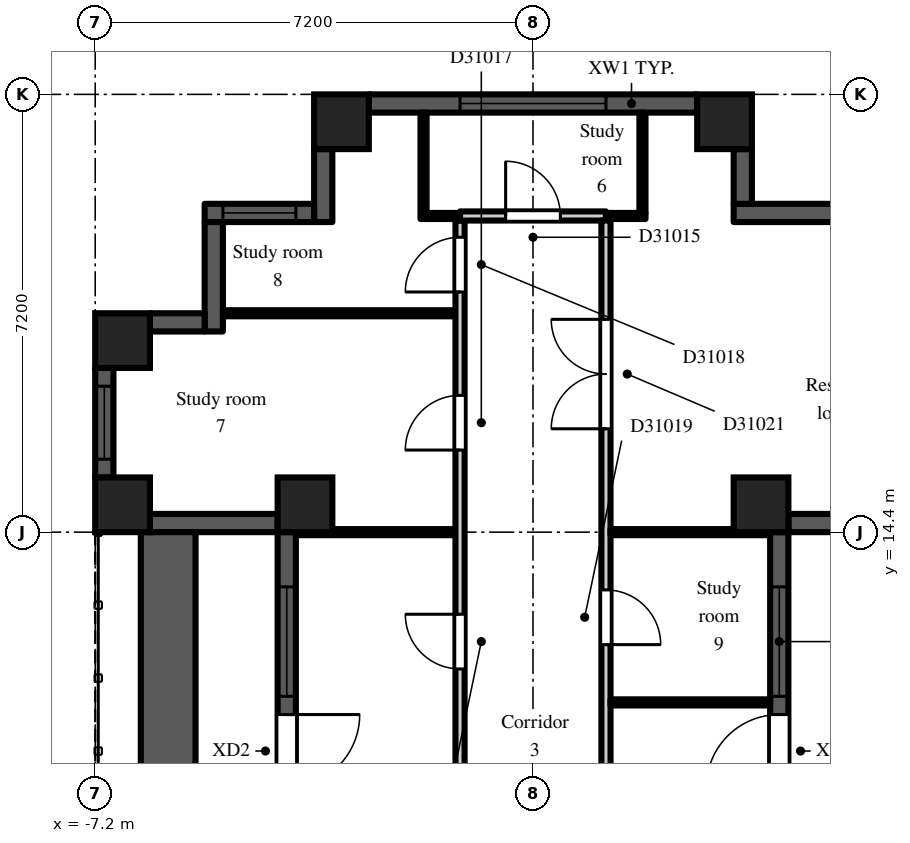
"""IFC4 building model, lengths in metres.
Left out: names, types, materials, properties, quantities, classifications, styles, units other than length and angle.
Written with IfcOpenShell. Run it as: python <this file> out.ifc"""

import sys

from ifc_helpers import new_model, si_unit, direction, frame, frame_2d, origin, origin_2d, place, context, subcontext, project, spatial, rectangle, extrude, element, fill, save


model = new_model("IFC4")
c1 = context("Model", 3, precision=1e-05, world=origin(), true_north=direction((0.0, 1.0)))
c2 = subcontext(c1, "Body", "Model", "MODEL_VIEW")
j1 = project(units=[si_unit("LENGTHUNIT", "METRE"), si_unit("PLANEANGLEUNIT", "RADIAN")], contexts=[c1])
p1 = place(None, origin())
s1 = spatial("IfcSite", under=j1, at=p1, CompositionType="ELEMENT")
p2 = place(p1, origin())
s2 = spatial("IfcBuilding", under=s1, at=p2, CompositionType="ELEMENT")
p3 = place(p2, frame((0.0, 0.0, 216.9)))
s3 = spatial("IfcBuildingStorey", under=s2, at=p3, CompositionType="ELEMENT", Elevation=216.9)
for number, where, z_axis, x_axis in (
    (1, (-6.75, 14.85, 0.0), (0.0, 0.0, 1.0), (1.0, 0.0, 0.0)),
    (2, (-6.75, 17.55, 0.0), (0.0, 0.0, 1.0), (1.0, 0.0, 0.0)),
    (3, (-3.75, 14.85, 0.0), (0.0, 0.0, 1.0), (1.0, 0.0, 0.0)),
    (4, (-3.15, 21.15, 0.0), (0.0, 0.0, 1.0), (1.0, 0.0, 0.0)),
    (5, (3.15, 21.15, 0.0), (0.0, 0.0, 1.0), (1.0, 0.0, 0.0)),
    (6, (3.75, 14.85, 0.0), (0.0, 0.0, 1.0), (1.0, 0.0, 0.0)),
):
    element("IfcColumn", number, at=place(p3, frame(where, z_axis=z_axis, x_axis=x_axis)), inside=s3, PredefinedType="COLUMN", context=c2, shape_type="SweptSolid", body=[
        extrude(rectangle(XDim=0.9, YDim=0.9, at=origin_2d()), origin(), (0.0, 0.0, 1.0), 3.0),
    ])
p4 = place(p3, frame((4.05, 7.2, 0.0), z_axis=(0.0, 0.0, 1.0), x_axis=(0.0, 1.0, 0.0)))
e7 = element("IfcWall", 7, at=p4, inside=s3, PredefinedType="SOLIDWALL", context=c2, shape_type="SweptSolid", body=[
    extrude(rectangle(XDim=7.2, YDim=0.3, at=frame_2d((3.6, 0.0))), origin(), (0.0, 0.0, 1.0), 2.3),
])
p5 = place(p4, frame((3.0, 0.0, 0.0)))
e8 = element("IfcOpeningElement", 8, at=p5, cuts=e7, PredefinedType="OPENING", context=c2, shape_type="SweptSolid", body=[
    extrude(rectangle(XDim=1.2, YDim=2.05, at=frame_2d((0.6, 1.025))), frame((0.0, 0.16, 0.0), z_axis=(0.0, -1.0, 0.0), x_axis=(1.0, 0.0, 0.0)), (0.0, 0.0, 1.0), 0.32),
])
p6 = place(p4, frame((0.9, 0.0, 0.2)))
e9 = element("IfcOpeningElement", 9, at=p6, cuts=e7, PredefinedType="OPENING", context=c2, shape_type="SweptSolid", body=[
    extrude(rectangle(XDim=1.8, YDim=1.85, at=frame_2d((0.9, 0.925))), frame((0.0, 0.16, 0.0), z_axis=(0.0, -1.0, 0.0), x_axis=(1.0, 0.0, 0.0)), (0.0, 0.0, 1.0), 0.32),
])
p7 = place(p4, frame((4.5, 0.0, 0.2)))
e10 = element("IfcOpeningElement", 10, at=p7, cuts=e7, PredefinedType="OPENING", context=c2, shape_type="SweptSolid", body=[
    extrude(rectangle(XDim=1.8, YDim=1.85, at=frame_2d((0.9, 0.925))), frame((0.0, 0.16, 0.0), z_axis=(0.0, -1.0, 0.0), x_axis=(1.0, 0.0, 0.0)), (0.0, 0.0, 1.0), 0.32),
])
p8 = place(p3, frame((4.2, 14.55, 0.0), z_axis=(0.0, 0.0, 1.0), x_axis=(1.0, 0.0, 0.0)))
e11 = element("IfcWall", 11, at=p8, inside=s3, PredefinedType="SOLIDWALL", context=c2, shape_type="SweptSolid", body=[
    extrude(rectangle(XDim=2.1, YDim=0.3, at=frame_2d((1.05, 0.0))), origin(), (0.0, 0.0, 1.0), 2.3),
])
p9 = place(p3, frame((5.1, 19.65, 0.0), z_axis=(0.0, 0.0, 1.0), x_axis=(-1.0, 0.0, 0.0)))
e12 = element("IfcWall", 12, at=p9, inside=s3, PredefinedType="SOLIDWALL", context=c2, shape_type="SweptSolid", body=[
    extrude(rectangle(XDim=1.8, YDim=0.3, at=frame_2d((0.9, 0.0))), origin(), (0.0, 0.0, 1.0), 2.6),
])
p10 = place(p3, frame((3.45, 19.8, 0.0), z_axis=(0.0, 0.0, 1.0), x_axis=(0.0, 1.0, 0.0)))
e13 = element("IfcWall", 13, at=p10, inside=s3, PredefinedType="SOLIDWALL", context=c2, shape_type="SweptSolid", body=[
    extrude(rectangle(XDim=0.9, YDim=0.3, at=frame_2d((0.45, 0.0))), origin(), (0.0, 0.0, 1.0), 2.6),
])
p11 = place(p3, frame((2.7, 21.45, 0.0), z_axis=(0.0, 0.0, 1.0), x_axis=(-1.0, 0.0, 0.0)))
e14 = element("IfcWall", 14, at=p11, inside=s3, PredefinedType="SOLIDWALL", context=c2, shape_type="SweptSolid", body=[
    extrude(rectangle(XDim=5.4, YDim=0.3, at=frame_2d((2.7, 0.0))), origin(), (0.0, 0.0, 1.0), 2.3),
])
p12 = place(p11, frame((1.5, 0.0, 0.2)))
e15 = element("IfcOpeningElement", 15, at=p12, cuts=e14, PredefinedType="OPENING", context=c2, shape_type="SweptSolid", body=[
    extrude(rectangle(XDim=2.4, YDim=1.85, at=frame_2d((1.2, 0.925))), frame((0.0, 0.16, 0.0), z_axis=(0.0, -1.0, 0.0), x_axis=(1.0, 0.0, 0.0)), (0.0, 0.0, 1.0), 0.32),
])
p13 = place(p3, frame((-3.45, 20.7, 0.0), z_axis=(0.0, 0.0, 1.0), x_axis=(0.0, -1.0, 0.0)))
e16 = element("IfcWall", 16, at=p13, inside=s3, PredefinedType="SOLIDWALL", context=c2, shape_type="SweptSolid", body=[
    extrude(rectangle(XDim=1.2, YDim=0.3, at=frame_2d((0.6, 0.0))), origin(), (0.0, 0.0, 1.0), 2.6),
])
p14 = place(p3, frame((-3.6, 19.65, 0.0), z_axis=(0.0, 0.0, 1.0), x_axis=(-1.0, 0.0, 0.0)))
e17 = element("IfcWall", 17, at=p14, inside=s3, PredefinedType="SOLIDWALL", context=c2, shape_type="SweptSolid", body=[
    extrude(rectangle(XDim=1.8, YDim=0.3, at=frame_2d((0.9, 0.0))), origin(), (0.0, 0.0, 1.0), 2.6),
])
p15 = place(p14, frame((0.3, 0.0, 0.2)))
e18 = element("IfcOpeningElement", 18, at=p15, cuts=e17, PredefinedType="OPENING", context=c2, shape_type="SweptSolid", body=[
    extrude(rectangle(XDim=1.2, YDim=1.85, at=frame_2d((0.6, 0.925))), frame((0.0, 0.16, 0.0), z_axis=(0.0, -1.0, 0.0), x_axis=(1.0, 0.0, 0.0)), (0.0, 0.0, 1.0), 0.32),
])
p16 = place(p3, frame((-5.25, 19.5, 0.0), z_axis=(0.0, 0.0, 1.0), x_axis=(0.0, -1.0, 0.0)))
e19 = element("IfcWall", 19, at=p16, inside=s3, PredefinedType="SOLIDWALL", context=c2, shape_type="SweptSolid", body=[
    extrude(rectangle(XDim=1.8, YDim=0.3, at=frame_2d((0.9, 0.0))), origin(), (0.0, 0.0, 1.0), 2.6),
])
p17 = place(p3, frame((-5.4, 17.85, 0.0), z_axis=(0.0, 0.0, 1.0), x_axis=(-1.0, 0.0, 0.0)))
e20 = element("IfcWall", 20, at=p17, inside=s3, PredefinedType="SOLIDWALL", context=c2, shape_type="SweptSolid", body=[
    extrude(rectangle(XDim=0.9, YDim=0.3, at=frame_2d((0.45, 0.0))), origin(), (0.0, 0.0, 1.0), 2.6),
])
p18 = place(p3, frame((-7.05, 17.1, 0.0), z_axis=(0.0, 0.0, 1.0), x_axis=(0.0, -1.0, 0.0)))
e21 = element("IfcWall", 21, at=p18, inside=s3, PredefinedType="SOLIDWALL", context=c2, shape_type="SweptSolid", body=[
    extrude(rectangle(XDim=1.8, YDim=0.3, at=frame_2d((0.9, 0.0))), origin(), (0.0, 0.0, 1.0), 2.3),
])
p19 = place(p18, frame((0.3, 0.0, 0.2)))
e22 = element("IfcOpeningElement", 22, at=p19, cuts=e21, PredefinedType="OPENING", context=c2, shape_type="SweptSolid", body=[
    extrude(rectangle(XDim=1.2, YDim=1.85, at=frame_2d((0.6, 0.925))), frame((0.0, 0.16, 0.0), z_axis=(0.0, -1.0, 0.0), x_axis=(1.0, 0.0, 0.0)), (0.0, 0.0, 1.0), 0.32),
])
p20 = place(p3, frame((-6.3, 14.55, 0.0), z_axis=(0.0, 0.0, 1.0), x_axis=(1.0, 0.0, 0.0)))
e23 = element("IfcWall", 23, at=p20, inside=s3, PredefinedType="SOLIDWALL", context=c2, shape_type="SweptSolid", body=[
    extrude(rectangle(XDim=2.1, YDim=0.3, at=frame_2d((1.05, 0.0))), origin(), (0.0, 0.0, 1.0), 2.3),
])
p21 = place(p3, frame((-4.05, 14.4, 0.0), z_axis=(0.0, 0.0, 1.0), x_axis=(0.0, -1.0, 0.0)))
e24 = element("IfcWall", 24, at=p21, inside=s3, PredefinedType="SOLIDWALL", context=c2, shape_type="SweptSolid", body=[
    extrude(rectangle(XDim=7.2, YDim=0.3, at=frame_2d((3.6, 0.0))), origin(), (0.0, 0.0, 1.0), 2.3),
])
p22 = place(p21, frame((3.0, 0.0, 0.0)))
e25 = element("IfcOpeningElement", 25, at=p22, cuts=e24, PredefinedType="OPENING", context=c2, shape_type="SweptSolid", body=[
    extrude(rectangle(XDim=1.2, YDim=2.05, at=frame_2d((0.6, 1.025))), frame((0.0, 0.16, 0.0), z_axis=(0.0, -1.0, 0.0), x_axis=(1.0, 0.0, 0.0)), (0.0, 0.0, 1.0), 0.32),
])
p23 = place(p21, frame((0.9, 0.0, 0.2)))
e26 = element("IfcOpeningElement", 26, at=p23, cuts=e24, PredefinedType="OPENING", context=c2, shape_type="SweptSolid", body=[
    extrude(rectangle(XDim=1.8, YDim=1.85, at=frame_2d((0.9, 0.925))), frame((0.0, 0.16, 0.0), z_axis=(0.0, -1.0, 0.0), x_axis=(1.0, 0.0, 0.0)), (0.0, 0.0, 1.0), 0.32),
])
p24 = place(p21, frame((4.5, 0.0, 0.2)))
e27 = element("IfcOpeningElement", 27, at=p24, cuts=e24, PredefinedType="OPENING", context=c2, shape_type="SweptSolid", body=[
    extrude(rectangle(XDim=1.8, YDim=1.85, at=frame_2d((0.9, 0.925))), frame((0.0, 0.16, 0.0), z_axis=(0.0, -1.0, 0.0), x_axis=(1.0, 0.0, 0.0)), (0.0, 0.0, 1.0), 0.32),
])
p25 = place(p3, frame((-6.0, 7.2, 0.0), z_axis=(0.0, 0.0, 1.0), x_axis=(0.0, 1.0, 0.0)))
e28 = element("IfcWall", 28, at=p25, inside=s3, PredefinedType="PARAPET", context=c2, shape_type="SweptSolid", body=[
    extrude(rectangle(XDim=7.2, YDim=0.9, at=frame_2d((3.6, 0.0))), origin(), (0.0, 0.0, 1.0), 0.8),
])
p26 = place(p3, frame((-5.1, 18.0, 0.0), z_axis=(0.0, 0.0, 1.0), x_axis=(1.0, 0.0, 0.0)))
e29 = element("IfcWall", 29, at=p26, inside=s3, PredefinedType="PARTITIONING", context=c2, shape_type="SweptSolid", body=[
    extrude(rectangle(XDim=3.825, YDim=0.1, at=frame_2d((1.913, 0.0))), origin(), (0.0, 0.0, 1.0), 2.6),
])
p27 = place(p3, frame((-3.9, 14.4, 0.0), z_axis=(0.0, 0.0, 1.0), x_axis=(1.0, 0.0, 0.0)))
e30 = element("IfcWall", 30, at=p27, inside=s3, PredefinedType="PARTITIONING", context=c2, shape_type="SweptSolid", body=[
    extrude(rectangle(XDim=2.625, YDim=0.1, at=frame_2d((1.312, 0.0))), origin(), (0.0, 0.0, 1.0), 2.6),
])
p28 = place(p3, frame((-1.8, 19.55, 0.0), z_axis=(0.0, 0.0, 1.0), x_axis=(0.0, 1.0, 0.0)))
e31 = element("IfcWall", 31, at=p28, inside=s3, PredefinedType="PARTITIONING", context=c2, shape_type="SweptSolid", body=[
    extrude(rectangle(XDim=1.75, YDim=0.1, at=frame_2d((0.875, 0.0))), origin(), (0.0, 0.0, 1.0), 2.6),
])
p29 = place(p3, frame((-1.75, 19.6, 0.0), z_axis=(0.0, 0.0, 1.0), x_axis=(1.0, 0.0, 0.0)))
e32 = element("IfcWall", 32, at=p29, inside=s3, PredefinedType="PARTITIONING", context=c2, shape_type="SweptSolid", body=[
    extrude(rectangle(XDim=0.55, YDim=0.1, at=frame_2d((0.275, 0.0))), origin(), (0.0, 0.0, 1.0), 2.6),
])
p30 = place(p3, frame((-1.2, 1.275, 0.0), z_axis=(0.0, 0.0, 1.0), x_axis=(0.0, 1.0, 0.0)))
e33 = element("IfcWall", 33, at=p30, inside=s3, PredefinedType="PARTITIONING", context=c2, shape_type="SweptSolid", body=[
    extrude(rectangle(XDim=18.25, YDim=0.15, at=frame_2d((9.125, 0.0))), origin(), (0.0, 0.0, 1.0), 2.6),
])
p31 = place(p30, frame((2.475, 0.0, 0.0)))
e34 = element("IfcOpeningElement", 34, at=p31, cuts=e33, PredefinedType="OPENING", context=c2, shape_type="SweptSolid", body=[
    extrude(rectangle(XDim=0.9, YDim=2.1, at=frame_2d((0.45, 1.05))), frame((0.0, 0.085, 0.0), z_axis=(0.0, -1.0, 0.0), x_axis=(1.0, 0.0, 0.0)), (0.0, 0.0, 1.0), 0.17),
])
p32 = place(p30, frame((10.875, 0.0, 0.0)))
e35 = element("IfcOpeningElement", 35, at=p32, cuts=e33, PredefinedType="OPENING", context=c2, shape_type="SweptSolid", body=[
    extrude(rectangle(XDim=0.9, YDim=2.1, at=frame_2d((0.45, 1.05))), frame((0.0, 0.085, 0.0), z_axis=(0.0, -1.0, 0.0), x_axis=(1.0, 0.0, 0.0)), (0.0, 0.0, 1.0), 0.17),
])
p33 = place(p30, frame((14.475, 0.0, 0.0)))
e36 = element("IfcOpeningElement", 36, at=p33, cuts=e33, PredefinedType="OPENING", context=c2, shape_type="SweptSolid", body=[
    extrude(rectangle(XDim=0.9, YDim=2.1, at=frame_2d((0.45, 1.05))), frame((0.0, 0.085, 0.0), z_axis=(0.0, -1.0, 0.0), x_axis=(1.0, 0.0, 0.0)), (0.0, 0.0, 1.0), 0.17),
])
p34 = place(p30, frame((17.075, 0.0, 0.0)))
e37 = element("IfcOpeningElement", 37, at=p34, cuts=e33, PredefinedType="OPENING", context=c2, shape_type="SweptSolid", body=[
    extrude(rectangle(XDim=0.9, YDim=2.1, at=frame_2d((0.45, 1.05))), frame((0.0, 0.085, 0.0), z_axis=(0.0, -1.0, 0.0), x_axis=(1.0, 0.0, 0.0)), (0.0, 0.0, 1.0), 0.17),
])
p35 = place(p3, frame((-1.2, 19.6, 0.0), z_axis=(0.0, 0.0, 1.0), x_axis=(1.0, 0.0, 0.0)))
e38 = element("IfcWall", 38, at=p35, inside=s3, PredefinedType="PARTITIONING", context=c2, shape_type="SweptSolid", body=[
    extrude(rectangle(XDim=2.4, YDim=0.15, at=frame_2d((1.2, 0.0))), origin(), (0.0, 0.0, 1.0), 2.6),
])
p36 = place(p35, frame((0.75, 0.0, 0.0)))
e39 = element("IfcOpeningElement", 39, at=p36, cuts=e38, PredefinedType="OPENING", context=c2, shape_type="SweptSolid", body=[
    extrude(rectangle(XDim=0.9, YDim=2.1, at=frame_2d((0.45, 1.05))), frame((0.0, 0.085, 0.0), z_axis=(0.0, -1.0, 0.0), x_axis=(1.0, 0.0, 0.0)), (0.0, 0.0, 1.0), 0.17),
])
p37 = place(p3, frame((1.2, 1.125, 0.0), z_axis=(0.0, 0.0, 1.0), x_axis=(0.0, 1.0, 0.0)))
e40 = element("IfcWall", 40, at=p37, inside=s3, PredefinedType="PARTITIONING", context=c2, shape_type="SweptSolid", body=[
    extrude(rectangle(XDim=18.4, YDim=0.15, at=frame_2d((9.2, 0.0))), origin(), (0.0, 0.0, 1.0), 2.6),
])
p38 = place(p37, frame((3.825, 0.0, 0.0)))
e41 = element("IfcOpeningElement", 41, at=p38, cuts=e40, PredefinedType="OPENING", context=c2, shape_type="SweptSolid", body=[
    extrude(rectangle(XDim=0.9, YDim=2.1, at=frame_2d((0.45, 1.05))), frame((0.0, 0.085, 0.0), z_axis=(0.0, -1.0, 0.0), x_axis=(1.0, 0.0, 0.0)), (0.0, 0.0, 1.0), 0.17),
])
p39 = place(p37, frame((11.425, 0.0, 0.0)))
e42 = element("IfcOpeningElement", 42, at=p39, cuts=e40, PredefinedType="OPENING", context=c2, shape_type="SweptSolid", body=[
    extrude(rectangle(XDim=0.9, YDim=2.1, at=frame_2d((0.45, 1.05))), frame((0.0, 0.085, 0.0), z_axis=(0.0, -1.0, 0.0), x_axis=(1.0, 0.0, 0.0)), (0.0, 0.0, 1.0), 0.17),
])
p40 = place(p37, frame((7.825, 0.0, 0.0)))
e43 = element("IfcOpeningElement", 43, at=p40, cuts=e40, PredefinedType="OPENING", context=c2, shape_type="SweptSolid", body=[
    extrude(rectangle(XDim=0.9, YDim=2.1, at=frame_2d((0.45, 1.05))), frame((0.0, 0.085, 0.0), z_axis=(0.0, -1.0, 0.0), x_axis=(1.0, 0.0, 0.0)), (0.0, 0.0, 1.0), 0.17),
])
p41 = place(p37, frame((14.975, 0.0, 0.0)))
e44 = element("IfcOpeningElement", 44, at=p41, cuts=e40, PredefinedType="OPENING", context=c2, shape_type="SweptSolid", body=[
    extrude(rectangle(XDim=1.8, YDim=2.1, at=frame_2d((0.9, 1.05))), frame((0.0, 0.085, 0.0), z_axis=(0.0, -1.0, 0.0), x_axis=(1.0, 0.0, 0.0)), (0.0, 0.0, 1.0), 0.17),
])
for number, where, z_axis, x_axis in (
    (45, (1.275, 11.6, 0.0), (0.0, 0.0, 1.0), (1.0, 0.0, 0.0)),
    (46, (1.275, 14.4, 0.0), (0.0, 0.0, 1.0), (1.0, 0.0, 0.0)),
):
    element("IfcWall", number, at=place(p3, frame(where, z_axis=z_axis, x_axis=x_axis)), inside=s3, PredefinedType="PARTITIONING", context=c2, shape_type="SweptSolid", body=[
        extrude(rectangle(XDim=2.625, YDim=0.1, at=frame_2d((1.312, 0.0))), origin(), (0.0, 0.0, 1.0), 2.6),
    ])
p42 = place(p3, frame((1.2, 19.6, 0.0), z_axis=(0.0, 0.0, 1.0), x_axis=(1.0, 0.0, 0.0)))
e47 = element("IfcWall", 47, at=p42, inside=s3, PredefinedType="PARTITIONING", context=c2, shape_type="SweptSolid", body=[
    extrude(rectangle(XDim=0.65, YDim=0.1, at=frame_2d((0.325, 0.0))), origin(), (0.0, 0.0, 1.0), 2.6),
])
p43 = place(p3, frame((1.8, 19.65, 0.0), z_axis=(0.0, 0.0, 1.0), x_axis=(0.0, 1.0, 0.0)))
e48 = element("IfcWall", 48, at=p43, inside=s3, PredefinedType="PARTITIONING", context=c2, shape_type="SweptSolid", body=[
    extrude(rectangle(XDim=1.65, YDim=0.1, at=frame_2d((0.825, 0.0))), origin(), (0.0, 0.0, 1.0), 2.6),
])
p44 = place(p5, origin())
e49 = element("IfcDoor", 49, at=p44, inside=s3, OperationType="SINGLE_SWING_LEFT", PredefinedType="DOOR", context=c2, shape_type="SweptSolid", body=[
    extrude(rectangle(XDim=1.2, YDim=2.05, at=frame_2d((0.6, 1.025))), frame((0.0, 0.025, 0.0), z_axis=(0.0, -1.0, 0.0), x_axis=(1.0, 0.0, 0.0)), (0.0, 0.0, 1.0), 0.05),
])
fill(e8, e49)
p45 = place(p7, origin())
e50 = element("IfcWindow", 50, at=p45, inside=s3, PartitioningType="SINGLE_PANEL", PredefinedType="WINDOW", context=c2, shape_type="SweptSolid", body=[
    extrude(rectangle(XDim=1.8, YDim=1.85, at=frame_2d((0.9, 0.925))), frame((0.0, 0.03, 0.0), z_axis=(0.0, -1.0, 0.0), x_axis=(1.0, 0.0, 0.0)), (0.0, 0.0, 1.0), 0.06),
])
fill(e10, e50)
p46 = place(p12, origin())
e51 = element("IfcWindow", 51, at=p46, inside=s3, PartitioningType="SINGLE_PANEL", PredefinedType="WINDOW", context=c2, shape_type="SweptSolid", body=[
    extrude(rectangle(XDim=2.4, YDim=1.85, at=frame_2d((1.2, 0.925))), frame((0.0, 0.03, 0.0), z_axis=(0.0, -1.0, 0.0), x_axis=(1.0, 0.0, 0.0)), (0.0, 0.0, 1.0), 0.06),
])
fill(e15, e51)
p47 = place(p15, origin())
e52 = element("IfcWindow", 52, at=p47, inside=s3, PartitioningType="SINGLE_PANEL", PredefinedType="WINDOW", context=c2, shape_type="SweptSolid", body=[
    extrude(rectangle(XDim=1.2, YDim=1.85, at=frame_2d((0.6, 0.925))), frame((0.0, 0.03, 0.0), z_axis=(0.0, -1.0, 0.0), x_axis=(1.0, 0.0, 0.0)), (0.0, 0.0, 1.0), 0.06),
])
fill(e18, e52)
p48 = place(p19, origin())
e53 = element("IfcWindow", 53, at=p48, inside=s3, PartitioningType="SINGLE_PANEL", PredefinedType="WINDOW", context=c2, shape_type="SweptSolid", body=[
    extrude(rectangle(XDim=1.2, YDim=1.85, at=frame_2d((0.6, 0.925))), frame((0.0, 0.03, 0.0), z_axis=(0.0, -1.0, 0.0), x_axis=(1.0, 0.0, 0.0)), (0.0, 0.0, 1.0), 0.06),
])
fill(e22, e53)
p49 = place(p22, origin())
e54 = element("IfcDoor", 54, at=p49, inside=s3, OperationType="SINGLE_SWING_LEFT", PredefinedType="DOOR", context=c2, shape_type="SweptSolid", body=[
    extrude(rectangle(XDim=1.2, YDim=2.05, at=frame_2d((0.6, 1.025))), frame((0.0, 0.025, 0.0), z_axis=(0.0, -1.0, 0.0), x_axis=(1.0, 0.0, 0.0)), (0.0, 0.0, 1.0), 0.05),
])
fill(e25, e54)
p50 = place(p23, origin())
e55 = element("IfcWindow", 55, at=p50, inside=s3, PartitioningType="SINGLE_PANEL", PredefinedType="WINDOW", context=c2, shape_type="SweptSolid", body=[
    extrude(rectangle(XDim=1.8, YDim=1.85, at=frame_2d((0.9, 0.925))), frame((0.0, 0.03, 0.0), z_axis=(0.0, -1.0, 0.0), x_axis=(1.0, 0.0, 0.0)), (0.0, 0.0, 1.0), 0.06),
])
fill(e26, e55)
p51 = place(p36, origin())
e56 = element("IfcDoor", 56, at=p51, inside=s3, OperationType="SINGLE_SWING_LEFT", PredefinedType="DOOR", context=c2, shape_type="SweptSolid", body=[
    extrude(rectangle(XDim=0.9, YDim=2.1, at=frame_2d((0.45, 1.05))), frame((0.0, 0.025, 0.0), z_axis=(0.0, -1.0, 0.0), x_axis=(1.0, 0.0, 0.0)), (0.0, 0.0, 1.0), 0.05),
])
fill(e39, e56)
p52 = place(p32, origin())
e57 = element("IfcDoor", 57, at=p52, inside=s3, OperationType="SINGLE_SWING_RIGHT", PredefinedType="DOOR", context=c2, shape_type="SweptSolid", body=[
    extrude(rectangle(XDim=0.9, YDim=2.1, at=frame_2d((0.45, 1.05))), frame((0.0, 0.025, 0.0), z_axis=(0.0, -1.0, 0.0), x_axis=(1.0, 0.0, 0.0)), (0.0, 0.0, 1.0), 0.05),
])
fill(e35, e57)
p53 = place(p33, origin())
e58 = element("IfcDoor", 58, at=p53, inside=s3, OperationType="SINGLE_SWING_LEFT", PredefinedType="DOOR", context=c2, shape_type="SweptSolid", body=[
    extrude(rectangle(XDim=0.9, YDim=2.1, at=frame_2d((0.45, 1.05))), frame((0.0, 0.025, 0.0), z_axis=(0.0, -1.0, 0.0), x_axis=(1.0, 0.0, 0.0)), (0.0, 0.0, 1.0), 0.05),
])
fill(e36, e58)
p54 = place(p34, origin())
e59 = element("IfcDoor", 59, at=p54, inside=s3, OperationType="SINGLE_SWING_LEFT", PredefinedType="DOOR", context=c2, shape_type="SweptSolid", body=[
    extrude(rectangle(XDim=0.9, YDim=2.1, at=frame_2d((0.45, 1.05))), frame((0.0, 0.025, 0.0), z_axis=(0.0, -1.0, 0.0), x_axis=(1.0, 0.0, 0.0)), (0.0, 0.0, 1.0), 0.05),
])
fill(e37, e59)
p55 = place(p39, frame((0.9, 0.0, 0.0), z_axis=(0.0, 0.0, 1.0), x_axis=(-1.0, 0.0, 0.0)))
e60 = element("IfcDoor", 60, at=p55, inside=s3, OperationType="SINGLE_SWING_RIGHT", PredefinedType="DOOR", context=c2, shape_type="SweptSolid", body=[
    extrude(rectangle(XDim=0.9, YDim=2.1, at=frame_2d((0.45, 1.05))), frame((0.0, 0.025, 0.0), z_axis=(0.0, -1.0, 0.0), x_axis=(1.0, 0.0, 0.0)), (0.0, 0.0, 1.0), 0.05),
])
fill(e42, e60)
p56 = place(p41, origin())
e61 = element("IfcDoor", 61, at=p56, inside=s3, OperationType="DOUBLE_DOOR_DOUBLE_SWING", PredefinedType="DOOR", context=c2, shape_type="SweptSolid", body=[
    extrude(rectangle(XDim=1.8, YDim=2.1, at=frame_2d((0.9, 1.05))), frame((0.0, 0.025, 0.0), z_axis=(0.0, -1.0, 0.0), x_axis=(1.0, 0.0, 0.0)), (0.0, 0.0, 1.0), 0.05),
])
fill(e44, e61)
save(model, sys.argv[1])
